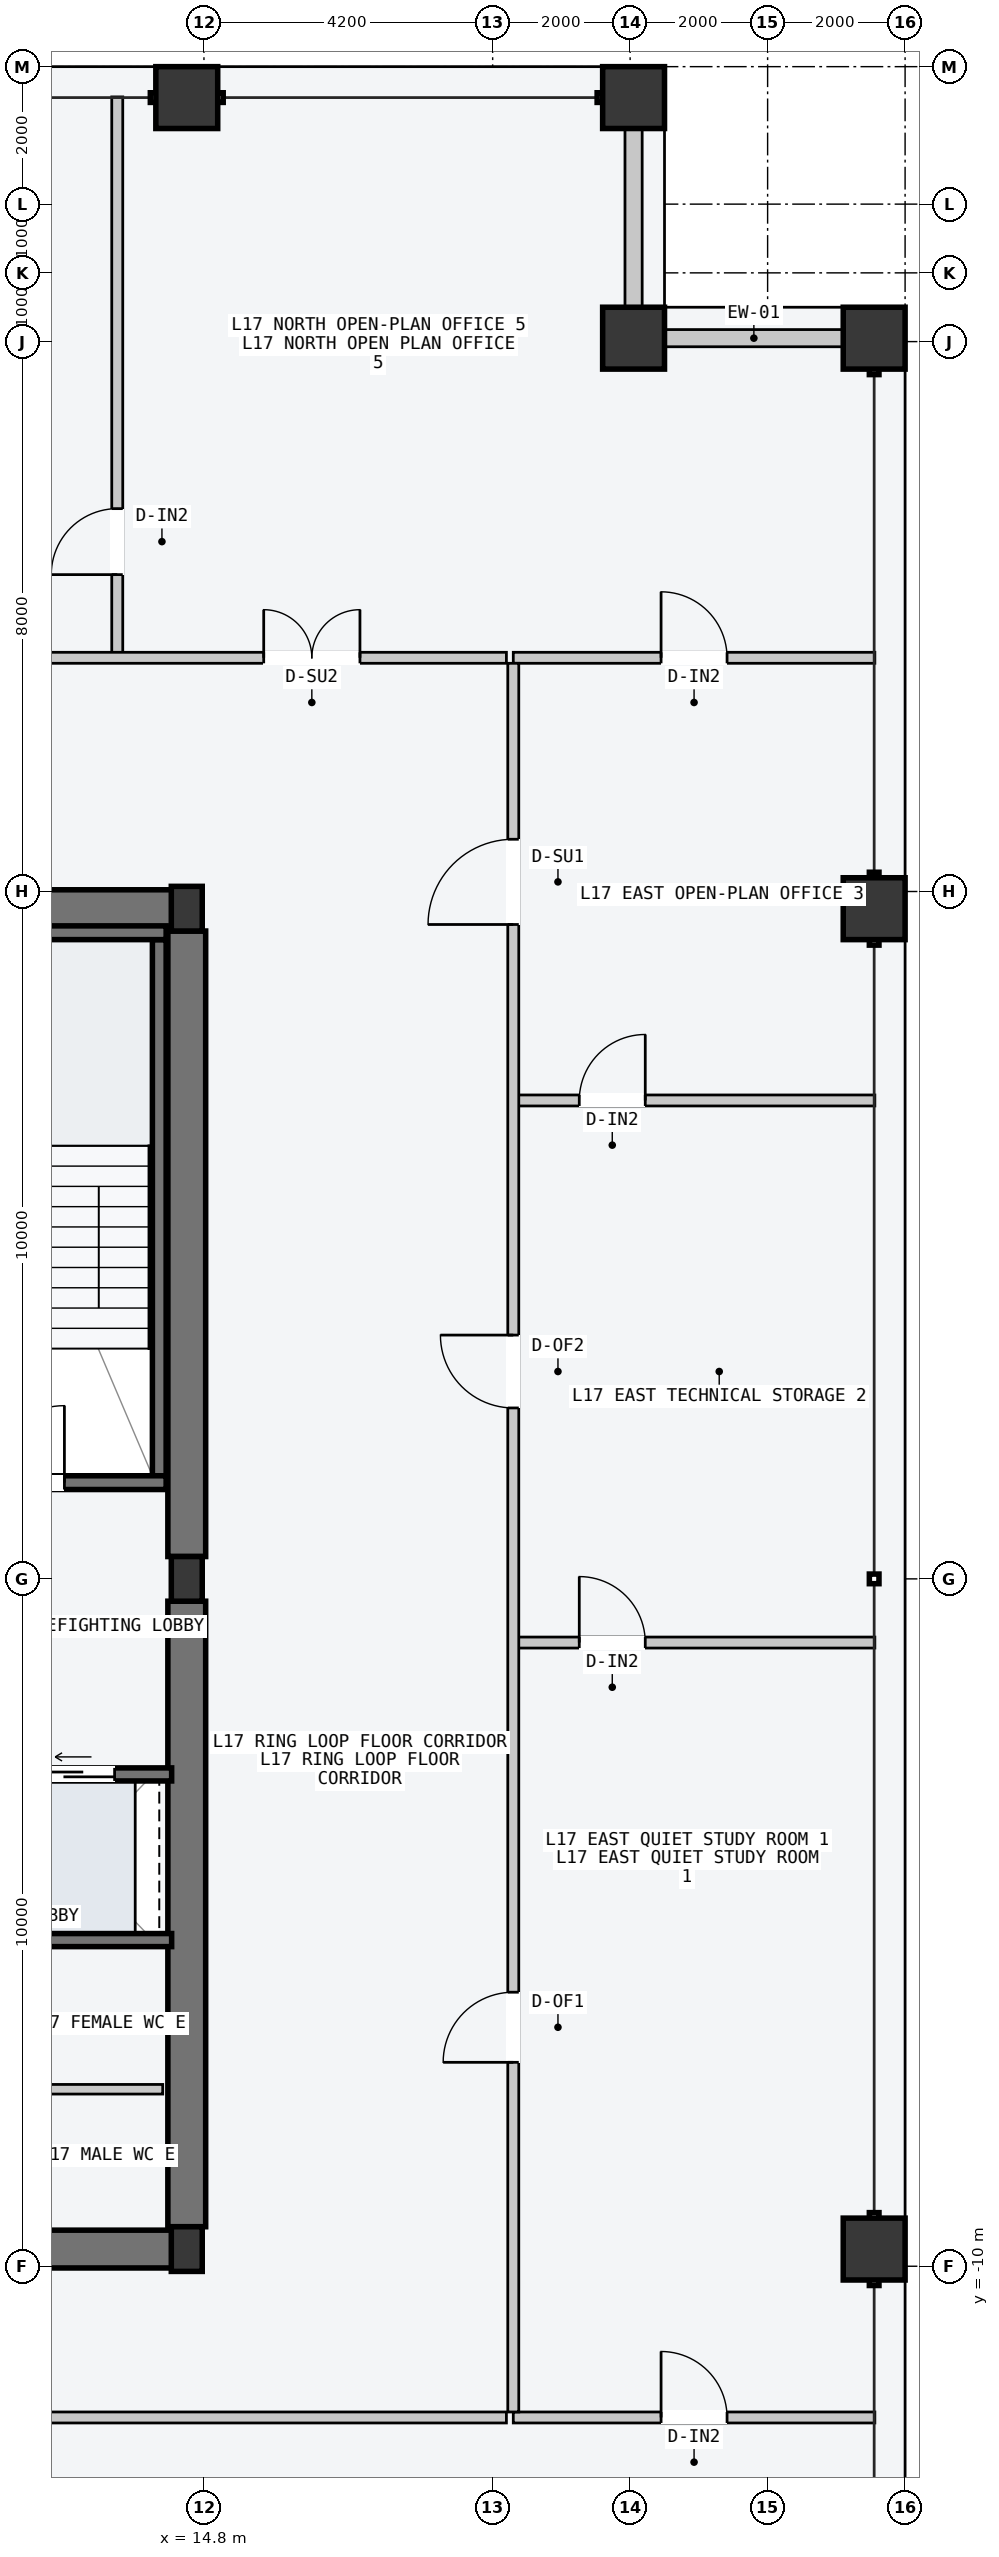
"""IFC4 building model, lengths in metres.
Left out: names, types, materials, properties, quantities, classifications, styles, units other than length and angle.
Written with IfcOpenShell. Run it as: python <this file> out.ifc"""

import sys

from ifc_helpers import new_model, si_unit, direction, frame, frame_2d, origin, origin_2d, place, context, subcontext, project, spatial, rectangle, hollow_rectangle, i_section, extrude, element, fill, save


model = new_model("IFC4")
c1 = context("Model", 3, precision=1e-05, world=origin(), true_north=direction((0.0, 1.0)))
c2 = subcontext(c1, "Body", "Model", "MODEL_VIEW")
j1 = project(units=[si_unit("LENGTHUNIT", "METRE"), si_unit("PLANEANGLEUNIT", "RADIAN")], contexts=[c1])
p1 = place(None, origin())
s1 = spatial("IfcSite", under=j1, at=p1, CompositionType="ELEMENT")
p2 = place(p1, origin())
s2 = spatial("IfcBuilding", under=s1, at=p2, CompositionType="ELEMENT")
p3 = place(p2, frame((0.0, 0.0, 67.2)))
s3 = spatial("IfcBuildingStorey", under=s2, at=p3, CompositionType="ELEMENT", Elevation=67.2)
for number, where, z_axis, x_axis in (
    (1, (8.07, -9.75, -0.2), (0.0, 0.0, 1.0), (1.0, 0.0, 0.0)),
    (2, (8.07, 9.75, -0.2), (0.0, 0.0, 1.0), (1.0, 0.0, 0.0)),
):
    element("IfcWall", number, at=place(p3, frame(where, z_axis=z_axis, x_axis=x_axis)), inside=s3, PredefinedType="SHEAR", context=c2, shape_type="SweptSolid", body=[
        extrude(rectangle(XDim=6.46, YDim=0.55, at=frame_2d((3.23, 0.0))), origin(), (0.0, 0.0, 1.0), 3.6),
    ])
for number, where, z_axis, x_axis in (
    (3, (14.55, -9.425, -0.2), (0.0, 0.0, 1.0), (0.0, 1.0, 0.0)),
    (4, (14.55, 0.325, -0.2), (0.0, 0.0, 1.0), (0.0, 1.0, 0.0)),
):
    element("IfcWall", number, at=place(p3, frame(where, z_axis=z_axis, x_axis=x_axis)), inside=s3, PredefinedType="SHEAR", context=c2, shape_type="SweptSolid", body=[
        extrude(rectangle(XDim=9.1, YDim=0.55, at=frame_2d((4.55, 0.0))), origin(), (0.0, 0.0, 1.0), 3.6),
    ])
p4 = place(p3, frame((14.15, 1.5, -0.2), z_axis=(0.0, 0.0, 1.0), x_axis=(0.0, 1.0, 0.0)))
e5 = element("IfcWall", 5, at=p4, inside=s3, PredefinedType="SOLIDWALL", context=c2, shape_type="SweptSolid", body=[
    extrude(rectangle(XDim=7.8, YDim=0.2, at=frame_2d((3.9, 0.0))), origin(), (0.0, 0.0, 1.0), 3.6),
])
p5 = place(p3, frame((10.15, 1.4, -0.2), z_axis=(0.0, 0.0, 1.0), x_axis=(1.0, 0.0, 0.0)))
e6 = element("IfcWall", 6, at=p5, inside=s3, PredefinedType="SOLIDWALL", context=c2, shape_type="SweptSolid", body=[
    extrude(rectangle(XDim=4.1, YDim=0.2, at=frame_2d((2.05, 0.0))), origin(), (0.0, 0.0, 1.0), 3.6),
])
p6 = place(p5, frame((1.5, 0.0, 0.2)))
e7 = element("IfcOpeningElement", 7, at=p6, cuts=e6, PredefinedType="OPENING", context=c2, shape_type="SweptSolid", body=[
    extrude(rectangle(XDim=1.12, YDim=2.18, at=frame_2d((0.56, 1.09))), frame((0.0, 0.11, 0.0), z_axis=(0.0, -1.0, 0.0), x_axis=(1.0, 0.0, 0.0)), (0.0, 0.0, 1.0), 0.22),
])
p7 = place(p3, frame((10.15, 9.4, -0.2), z_axis=(0.0, 0.0, 1.0), x_axis=(1.0, 0.0, 0.0)))
e8 = element("IfcWall", 8, at=p7, inside=s3, PredefinedType="SOLIDWALL", context=c2, shape_type="SweptSolid", body=[
    extrude(rectangle(XDim=4.1, YDim=0.2, at=frame_2d((2.05, 0.0))), origin(), (0.0, 0.0, 1.0), 3.6),
])
for number, where, z_axis, x_axis in (
    (9, (14.55, -9.75, 0.0), (0.0, 0.0, 1.0), (1.0, 0.0, 0.0)),
    (10, (14.55, 0.0, 0.0), (0.0, 0.0, 1.0), (1.0, 0.0, 0.0)),
    (11, (14.55, 9.75, 0.0), (0.0, 0.0, 1.0), (1.0, 0.0, 0.0)),
):
    element("IfcColumn", number, at=place(p3, frame(where, z_axis=z_axis, x_axis=x_axis)), inside=s3, PredefinedType="COLUMN", context=c2, shape_type="SweptSolid", body=[
        extrude(i_section(OverallWidth=0.45, OverallDepth=0.65, WebThickness=0.025, FlangeThickness=0.04, at=origin_2d()), origin(), (0.0, 0.0, 1.0), 3.6),
    ])
for number, where, z_axis, x_axis in (
    (12, (14.55, 21.55, 0.0), (0.0, 0.0, 1.0), (1.0, 0.0, 0.0)),
    (13, (21.05, 21.55, 0.0), (0.0, 0.0, 1.0), (1.0, 0.0, 0.0)),
    (14, (24.55, -9.75, 0.0), (0.0, 0.0, 1.0), (0.0, 1.0, 0.0)),
    (15, (24.55, 9.75, 0.0), (0.0, 0.0, 1.0), (0.0, 1.0, 0.0)),
    (16, (24.55, 18.05, 0.0), (0.0, 0.0, 1.0), (0.0, 1.0, 0.0)),
    (17, (21.05, 18.05, 0.0), (0.0, 0.0, 1.0), (1.0, 0.0, 0.0)),
):
    element("IfcColumn", number, at=place(p3, frame(where, z_axis=z_axis, x_axis=x_axis)), inside=s3, PredefinedType="COLUMN", context=c2, shape_type="SweptSolid", body=[
        extrude(hollow_rectangle(XDim=0.9, YDim=0.9, WallThickness=0.045, at=origin_2d()), origin(), (0.0, 0.0, 1.0), 3.6),
    ])
for number, where, z_axis, x_axis in (
    (18, (21.51, 18.05, 0.0), (0.0, 0.0, 1.0), (1.0, 0.0, 0.0)),
    (19, (21.05, 18.51, 0.0), (0.0, 0.0, 1.0), (0.0, 1.0, 0.0)),
):
    element("IfcWall", number, at=place(p3, frame(where, z_axis=z_axis, x_axis=x_axis)), inside=s3, PredefinedType="STANDARD", context=c2, shape_type="SweptSolid", body=[
        extrude(rectangle(XDim=2.58, YDim=0.25, at=frame_2d((1.29, 0.0))), origin(), (0.0, 0.0, 1.0), 2.7),
    ])
p8 = place(p3, frame((11.65, -2.845, -0.2), z_axis=(0.0, 0.0, 1.0), x_axis=(1.0, 0.0, 0.0)))
e20 = element("IfcWall", 20, at=p8, inside=s3, PredefinedType="SOLIDWALL", context=c2, shape_type="SweptSolid", body=[
    extrude(rectangle(XDim=2.68, YDim=0.19, at=frame_2d((1.34, 0.0))), origin(), (0.0, 0.0, 1.0), 3.6),
])
p9 = place(p8, frame((0.65, 0.0, 0.2)))
e21 = element("IfcOpeningElement", 21, at=p9, cuts=e20, PredefinedType="OPENING", context=c2, shape_type="SweptSolid", body=[
    extrude(rectangle(XDim=1.2, YDim=2.2, at=frame_2d((0.6, 1.1))), frame((0.0, 0.105, 0.0), z_axis=(0.0, -1.0, 0.0), x_axis=(1.0, 0.0, 0.0)), (0.0, 0.0, 1.0), 0.21),
])
p10 = place(p3, frame((11.65, -5.255, -0.2), z_axis=(0.0, 0.0, 1.0), x_axis=(1.0, 0.0, 0.0)))
e22 = element("IfcWall", 22, at=p10, inside=s3, PredefinedType="SOLIDWALL", context=c2, shape_type="SweptSolid", body=[
    extrude(rectangle(XDim=2.68, YDim=0.19, at=frame_2d((1.34, 0.0))), origin(), (0.0, 0.0, 1.0), 3.6),
])
p11 = place(p3, frame((11.7, -7.425, 0.0), z_axis=(0.0, 0.0, 1.0), x_axis=(1.0, 0.0, 0.0)))
e23 = element("IfcWall", 23, at=p11, inside=s3, PredefinedType="PARTITIONING", context=c2, shape_type="SweptSolid", body=[
    extrude(rectangle(XDim=2.5, YDim=0.14, at=frame_2d((1.25, 0.0))), origin(), (0.0, 0.0, 1.0), 3.4),
])
p12 = place(p3, frame((13.539, 13.46, 0.0), z_axis=(0.0, 0.0, 1.0), x_axis=(0.0, 1.0, 0.0)))
e24 = element("IfcWall", 24, at=p12, inside=s3, PredefinedType="PARTITIONING", context=c2, shape_type="SweptSolid", body=[
    extrude(rectangle(XDim=8.1, YDim=0.16, at=frame_2d((4.05, 0.0))), origin(), (0.0, 0.0, 1.0), 3.4),
])
p13 = place(p12, frame((1.15, 0.0, 0.0)))
e25 = element("IfcOpeningElement", 25, at=p13, cuts=e24, PredefinedType="OPENING", context=c2, shape_type="SweptSolid", body=[
    extrude(rectangle(XDim=0.96, YDim=2.18, at=frame_2d((0.48, 1.09))), frame((0.0, 0.09, 0.0), z_axis=(0.0, -1.0, 0.0), x_axis=(1.0, 0.0, 0.0)), (0.0, 0.0, 1.0), 0.18),
])
p14 = place(p3, frame((-19.2, 13.4, 0.0), z_axis=(0.0, 0.0, 1.0), x_axis=(1.0, 0.0, 0.0)))
e26 = element("IfcWall", 26, at=p14, inside=s3, PredefinedType="PARTITIONING", context=c2, shape_type="SweptSolid", body=[
    extrude(rectangle(XDim=38.4, YDim=0.16, at=frame_2d((19.2, 0.0))), origin(), (0.0, 0.0, 1.0), 3.4),
])
p15 = place(p14, frame((4.143, 0.0, 0.0)))
e27 = element("IfcOpeningElement", 27, at=p15, cuts=e26, PredefinedType="OPENING", context=c2, shape_type="SweptSolid", body=[
    extrude(rectangle(XDim=0.96, YDim=2.18, at=frame_2d((0.48, 1.09))), frame((0.0, 0.09, 0.0), z_axis=(0.0, -1.0, 0.0), x_axis=(1.0, 0.0, 0.0)), (0.0, 0.0, 1.0), 0.18),
])
p16 = place(p14, frame((13.115, 0.0, 0.0)))
e28 = element("IfcOpeningElement", 28, at=p16, cuts=e26, PredefinedType="OPENING", context=c2, shape_type="SweptSolid", body=[
    extrude(rectangle(XDim=1.02, YDim=2.2, at=frame_2d((0.51, 1.1))), frame((0.0, 0.09, 0.0), z_axis=(0.0, -1.0, 0.0), x_axis=(1.0, 0.0, 0.0)), (0.0, 0.0, 1.0), 0.18),
])
p17 = place(p14, frame((21.258, 0.0, 0.0)))
e29 = element("IfcOpeningElement", 29, at=p17, cuts=e26, PredefinedType="OPENING", context=c2, shape_type="SweptSolid", body=[
    extrude(rectangle(XDim=1.06, YDim=2.2, at=frame_2d((0.53, 1.1))), frame((0.0, 0.09, 0.0), z_axis=(0.0, -1.0, 0.0), x_axis=(1.0, 0.0, 0.0)), (0.0, 0.0, 1.0), 0.18),
])
p18 = place(p14, frame((28.535, 0.0, 0.0)))
e30 = element("IfcOpeningElement", 30, at=p18, cuts=e26, PredefinedType="OPENING", context=c2, shape_type="SweptSolid", body=[
    extrude(rectangle(XDim=1.24, YDim=2.24, at=frame_2d((0.62, 1.12))), frame((0.0, 0.09, 0.0), z_axis=(0.0, -1.0, 0.0), x_axis=(1.0, 0.0, 0.0)), (0.0, 0.0, 1.0), 0.18),
])
p19 = place(p14, frame((34.869, 0.0, 0.0)))
e31 = element("IfcOpeningElement", 31, at=p19, cuts=e26, PredefinedType="OPENING", context=c2, shape_type="SweptSolid", body=[
    extrude(rectangle(XDim=1.4, YDim=2.2, at=frame_2d((0.7, 1.1))), frame((0.0, 0.09, 0.0), z_axis=(0.0, -1.0, 0.0), x_axis=(1.0, 0.0, 0.0)), (0.0, 0.0, 1.0), 0.18),
])
p20 = place(p3, frame((19.3, 13.4, 0.0), z_axis=(0.0, 0.0, 1.0), x_axis=(1.0, 0.0, 0.0)))
e32 = element("IfcWall", 32, at=p20, inside=s3, PredefinedType="PARTITIONING", context=c2, shape_type="SweptSolid", body=[
    extrude(rectangle(XDim=5.26, YDim=0.16, at=frame_2d((2.63, 0.0))), origin(), (0.0, 0.0, 1.0), 3.4),
])
p21 = place(p20, frame((2.15, 0.0, 0.0)))
e33 = element("IfcOpeningElement", 33, at=p21, cuts=e32, PredefinedType="OPENING", context=c2, shape_type="SweptSolid", body=[
    extrude(rectangle(XDim=0.96, YDim=2.18, at=frame_2d((0.48, 1.09))), frame((0.0, 0.09, 0.0), z_axis=(0.0, -1.0, 0.0), x_axis=(1.0, 0.0, 0.0)), (0.0, 0.0, 1.0), 0.18),
])
p22 = place(p3, frame((-19.2, -12.2, 0.0), z_axis=(0.0, 0.0, 1.0), x_axis=(1.0, 0.0, 0.0)))
e34 = element("IfcWall", 34, at=p22, inside=s3, PredefinedType="PARTITIONING", context=c2, shape_type="SweptSolid", body=[
    extrude(rectangle(XDim=38.4, YDim=0.16, at=frame_2d((19.2, 0.0))), origin(), (0.0, 0.0, 1.0), 3.4),
])
p23 = place(p22, frame((7.387, 0.0, 0.0)))
e35 = element("IfcOpeningElement", 35, at=p23, cuts=e34, PredefinedType="OPENING", context=c2, shape_type="SweptSolid", body=[
    extrude(rectangle(XDim=1.24, YDim=2.24, at=frame_2d((0.62, 1.12))), frame((0.0, 0.09, 0.0), z_axis=(0.0, -1.0, 0.0), x_axis=(1.0, 0.0, 0.0)), (0.0, 0.0, 1.0), 0.18),
])
p24 = place(p22, frame((26.507, 0.0, 0.0)))
e36 = element("IfcOpeningElement", 36, at=p24, cuts=e34, PredefinedType="OPENING", context=c2, shape_type="SweptSolid", body=[
    extrude(rectangle(XDim=1.4, YDim=2.2, at=frame_2d((0.7, 1.1))), frame((0.0, 0.09, 0.0), z_axis=(0.0, -1.0, 0.0), x_axis=(1.0, 0.0, 0.0)), (0.0, 0.0, 1.0), 0.18),
])
p25 = place(p3, frame((19.3, -12.2, 0.0), z_axis=(0.0, 0.0, 1.0), x_axis=(1.0, 0.0, 0.0)))
e37 = element("IfcWall", 37, at=p25, inside=s3, PredefinedType="PARTITIONING", context=c2, shape_type="SweptSolid", body=[
    extrude(rectangle(XDim=5.26, YDim=0.16, at=frame_2d((2.63, 0.0))), origin(), (0.0, 0.0, 1.0), 3.4),
])
p26 = place(p25, frame((2.15, 0.0, 0.0)))
e38 = element("IfcOpeningElement", 38, at=p26, cuts=e37, PredefinedType="OPENING", context=c2, shape_type="SweptSolid", body=[
    extrude(rectangle(XDim=0.96, YDim=2.18, at=frame_2d((0.48, 1.09))), frame((0.0, 0.09, 0.0), z_axis=(0.0, -1.0, 0.0), x_axis=(1.0, 0.0, 0.0)), (0.0, 0.0, 1.0), 0.18),
])
p27 = place(p3, frame((19.36, -0.927, 0.0), z_axis=(0.0, 0.0, 1.0), x_axis=(1.0, 0.0, 0.0)))
e39 = element("IfcWall", 39, at=p27, inside=s3, PredefinedType="PARTITIONING", context=c2, shape_type="SweptSolid", body=[
    extrude(rectangle(XDim=5.2, YDim=0.16, at=frame_2d((2.6, 0.0))), origin(), (0.0, 0.0, 1.0), 3.4),
])
p28 = place(p27, frame((0.9, 0.0, 0.0)))
e40 = element("IfcOpeningElement", 40, at=p28, cuts=e39, PredefinedType="OPENING", context=c2, shape_type="SweptSolid", body=[
    extrude(rectangle(XDim=0.96, YDim=2.18, at=frame_2d((0.48, 1.09))), frame((0.0, 0.09, 0.0), z_axis=(0.0, -1.0, 0.0), x_axis=(1.0, 0.0, 0.0)), (0.0, 0.0, 1.0), 0.18),
])
p29 = place(p3, frame((19.36, 6.96, 0.0), z_axis=(0.0, 0.0, 1.0), x_axis=(1.0, 0.0, 0.0)))
e41 = element("IfcWall", 41, at=p29, inside=s3, PredefinedType="PARTITIONING", context=c2, shape_type="SweptSolid", body=[
    extrude(rectangle(XDim=5.2, YDim=0.16, at=frame_2d((2.6, 0.0))), origin(), (0.0, 0.0, 1.0), 3.4),
])
p30 = place(p29, frame((0.9, 0.0, 0.0)))
e42 = element("IfcOpeningElement", 42, at=p30, cuts=e41, PredefinedType="OPENING", context=c2, shape_type="SweptSolid", body=[
    extrude(rectangle(XDim=0.96, YDim=2.18, at=frame_2d((0.48, 1.09))), frame((0.0, 0.09, 0.0), z_axis=(0.0, -1.0, 0.0), x_axis=(1.0, 0.0, 0.0)), (0.0, 0.0, 1.0), 0.18),
])
p31 = place(p3, frame((19.3, -12.12, 0.0), z_axis=(0.0, 0.0, 1.0), x_axis=(0.0, 1.0, 0.0)))
e43 = element("IfcWall", 43, at=p31, inside=s3, PredefinedType="PARTITIONING", context=c2, shape_type="SweptSolid", body=[
    extrude(rectangle(XDim=25.44, YDim=0.16, at=frame_2d((12.72, 0.0))), origin(), (0.0, 0.0, 1.0), 3.4),
])
p32 = place(p31, frame((5.087, 0.0, 0.0)))
e44 = element("IfcOpeningElement", 44, at=p32, cuts=e43, PredefinedType="OPENING", context=c2, shape_type="SweptSolid", body=[
    extrude(rectangle(XDim=1.02, YDim=2.2, at=frame_2d((0.51, 1.1))), frame((0.0, 0.09, 0.0), z_axis=(0.0, -1.0, 0.0), x_axis=(1.0, 0.0, 0.0)), (0.0, 0.0, 1.0), 0.18),
])
p33 = place(p31, frame((14.607, 0.0, 0.0)))
e45 = element("IfcOpeningElement", 45, at=p33, cuts=e43, PredefinedType="OPENING", context=c2, shape_type="SweptSolid", body=[
    extrude(rectangle(XDim=1.06, YDim=2.2, at=frame_2d((0.53, 1.1))), frame((0.0, 0.09, 0.0), z_axis=(0.0, -1.0, 0.0), x_axis=(1.0, 0.0, 0.0)), (0.0, 0.0, 1.0), 0.18),
])
p34 = place(p31, frame((21.64, 0.0, 0.0)))
e46 = element("IfcOpeningElement", 46, at=p34, cuts=e43, PredefinedType="OPENING", context=c2, shape_type="SweptSolid", body=[
    extrude(rectangle(XDim=1.24, YDim=2.24, at=frame_2d((0.62, 1.12))), frame((0.0, 0.09, 0.0), z_axis=(0.0, -1.0, 0.0), x_axis=(1.0, 0.0, 0.0)), (0.0, 0.0, 1.0), 0.18),
])
p35 = place(p6, origin())
e47 = element("IfcDoor", 47, at=p35, inside=s3, OperationType="SINGLE_SWING_RIGHT", PredefinedType="DOOR", context=c2, shape_type="SweptSolid", body=[
    extrude(rectangle(XDim=1.12, YDim=2.18, at=frame_2d((0.56, 1.09))), frame((0.0, 0.025, 0.0), z_axis=(0.0, -1.0, 0.0), x_axis=(1.0, 0.0, 0.0)), (0.0, 0.0, 1.0), 0.05),
])
fill(e7, e47)
p36 = place(p9, origin())
e48 = element("IfcDoor", 48, at=p36, inside=s3, OperationType="SLIDING_TO_LEFT", PredefinedType="DOOR", context=c2, shape_type="SweptSolid", body=[
    extrude(rectangle(XDim=1.2, YDim=2.2, at=frame_2d((0.6, 1.1))), frame((0.0, 0.025, 0.0), z_axis=(0.0, -1.0, 0.0), x_axis=(1.0, 0.0, 0.0)), (0.0, 0.0, 1.0), 0.05),
])
fill(e21, e48)
p37 = place(p13, origin())
e49 = element("IfcDoor", 49, at=p37, inside=s3, OperationType="SINGLE_SWING_LEFT", PredefinedType="DOOR", context=c2, shape_type="SweptSolid", body=[
    extrude(rectangle(XDim=0.96, YDim=2.18, at=frame_2d((0.48, 1.09))), frame((0.0, 0.025, 0.0), z_axis=(0.0, -1.0, 0.0), x_axis=(1.0, 0.0, 0.0)), (0.0, 0.0, 1.0), 0.05),
])
fill(e25, e49)
p38 = place(p19, origin())
e50 = element("IfcDoor", 50, at=p38, inside=s3, OperationType="DOUBLE_DOOR_SINGLE_SWING", PredefinedType="DOOR", context=c2, shape_type="SweptSolid", body=[
    extrude(rectangle(XDim=1.4, YDim=2.2, at=frame_2d((0.7, 1.1))), frame((0.0, 0.025, 0.0), z_axis=(0.0, -1.0, 0.0), x_axis=(1.0, 0.0, 0.0)), (0.0, 0.0, 1.0), 0.05),
])
fill(e31, e50)
p39 = place(p21, origin())
e51 = element("IfcDoor", 51, at=p39, inside=s3, OperationType="SINGLE_SWING_LEFT", PredefinedType="DOOR", context=c2, shape_type="SweptSolid", body=[
    extrude(rectangle(XDim=0.96, YDim=2.18, at=frame_2d((0.48, 1.09))), frame((0.0, 0.025, 0.0), z_axis=(0.0, -1.0, 0.0), x_axis=(1.0, 0.0, 0.0)), (0.0, 0.0, 1.0), 0.05),
])
fill(e33, e51)
p40 = place(p26, origin())
e52 = element("IfcDoor", 52, at=p40, inside=s3, OperationType="SINGLE_SWING_LEFT", PredefinedType="DOOR", context=c2, shape_type="SweptSolid", body=[
    extrude(rectangle(XDim=0.96, YDim=2.18, at=frame_2d((0.48, 1.09))), frame((0.0, 0.025, 0.0), z_axis=(0.0, -1.0, 0.0), x_axis=(1.0, 0.0, 0.0)), (0.0, 0.0, 1.0), 0.05),
])
fill(e38, e52)
p41 = place(p28, origin())
e53 = element("IfcDoor", 53, at=p41, inside=s3, OperationType="SINGLE_SWING_LEFT", PredefinedType="DOOR", context=c2, shape_type="SweptSolid", body=[
    extrude(rectangle(XDim=0.96, YDim=2.18, at=frame_2d((0.48, 1.09))), frame((0.0, 0.025, 0.0), z_axis=(0.0, -1.0, 0.0), x_axis=(1.0, 0.0, 0.0)), (0.0, 0.0, 1.0), 0.05),
])
fill(e40, e53)
p42 = place(p30, origin())
e54 = element("IfcDoor", 54, at=p42, inside=s3, OperationType="SINGLE_SWING_RIGHT", PredefinedType="DOOR", context=c2, shape_type="SweptSolid", body=[
    extrude(rectangle(XDim=0.96, YDim=2.18, at=frame_2d((0.48, 1.09))), frame((0.0, 0.025, 0.0), z_axis=(0.0, -1.0, 0.0), x_axis=(1.0, 0.0, 0.0)), (0.0, 0.0, 1.0), 0.05),
])
fill(e42, e54)
p43 = place(p32, origin())
e55 = element("IfcDoor", 55, at=p43, inside=s3, OperationType="SINGLE_SWING_LEFT", PredefinedType="DOOR", context=c2, shape_type="SweptSolid", body=[
    extrude(rectangle(XDim=1.02, YDim=2.2, at=frame_2d((0.51, 1.1))), frame((0.0, 0.025, 0.0), z_axis=(0.0, -1.0, 0.0), x_axis=(1.0, 0.0, 0.0)), (0.0, 0.0, 1.0), 0.05),
])
fill(e44, e55)
p44 = place(p33, origin())
e56 = element("IfcDoor", 56, at=p44, inside=s3, OperationType="SINGLE_SWING_RIGHT", PredefinedType="DOOR", context=c2, shape_type="SweptSolid", body=[
    extrude(rectangle(XDim=1.06, YDim=2.2, at=frame_2d((0.53, 1.1))), frame((0.0, 0.025, 0.0), z_axis=(0.0, -1.0, 0.0), x_axis=(1.0, 0.0, 0.0)), (0.0, 0.0, 1.0), 0.05),
])
fill(e45, e56)
p45 = place(p34, origin())
e57 = element("IfcDoor", 57, at=p45, inside=s3, OperationType="SINGLE_SWING_LEFT", PredefinedType="DOOR", context=c2, shape_type="SweptSolid", body=[
    extrude(rectangle(XDim=1.24, YDim=2.24, at=frame_2d((0.62, 1.12))), frame((0.0, 0.025, 0.0), z_axis=(0.0, -1.0, 0.0), x_axis=(1.0, 0.0, 0.0)), (0.0, 0.0, 1.0), 0.05),
])
fill(e46, e57)
save(model, sys.argv[1])
